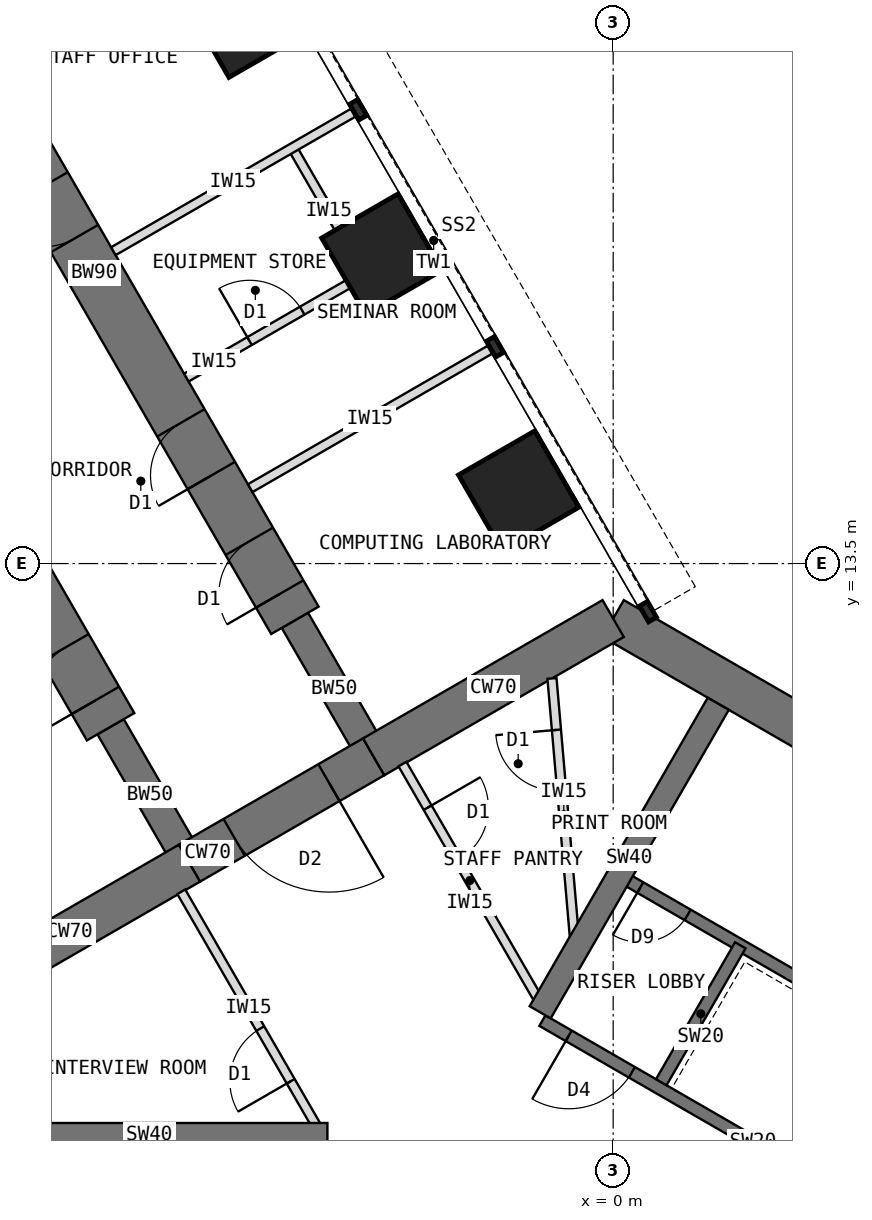
"""IFC4 building model, lengths in metres.
Left out: names, types, materials, properties, quantities, classifications, styles, units other than length and angle.
Written with IfcOpenShell. Run it as: python <this file> out.ifc"""

import sys

from ifc_helpers import new_model, si_unit, direction, frame, frame_2d, origin, origin_2d, place, context, subcontext, project, spatial, rectangle, extrude, element, fill, save


model = new_model("IFC4")
c1 = context("Model", 3, precision=1e-05, world=origin(), true_north=direction((0.0, 1.0)))
c2 = subcontext(c1, "Body", "Model", "MODEL_VIEW")
j1 = project(units=[si_unit("LENGTHUNIT", "METRE"), si_unit("PLANEANGLEUNIT", "RADIAN")], contexts=[c1])
p1 = place(None, origin())
s1 = spatial("IfcSite", under=j1, at=p1, CompositionType="ELEMENT")
p2 = place(p1, origin())
s2 = spatial("IfcBuilding", under=s1, at=p2, CompositionType="ELEMENT")
p3 = place(p2, frame((0.0, 0.0, 64.5)))
s3 = spatial("IfcBuildingStorey", under=s2, at=p3, CompositionType="ELEMENT", Elevation=64.5)
p4 = place(p3, frame((10.908, 6.298, 0.0), z_axis=(0.0, 0.0, 1.0), x_axis=(-0.866021940709, 0.500005998175, 0.0)))
e1 = element("IfcWall", 1, at=p4, inside=s3, PredefinedType="SHEAR", context=c2, shape_type="SweptSolid", body=[
    extrude(rectangle(XDim=12.596, YDim=0.7, at=frame_2d((6.298, 0.0))), origin(), (0.0, 0.0, 1.0), 4.0),
])
p5 = place(p3, frame((0.0, 12.596, 0.0), z_axis=(0.0, 0.0, 1.0), x_axis=(-0.866011268655, -0.500024481964, 0.0)))
e2 = element("IfcWall", 2, at=p5, inside=s3, PredefinedType="SHEAR", context=c2, shape_type="SweptSolid", body=[
    extrude(rectangle(XDim=4.548, YDim=0.7, at=frame_2d((2.274, 0.0))), origin(), (0.0, 0.0, 1.0), 4.0),
])
p6 = place(p3, frame((-3.939, 10.322, 0.0), z_axis=(0.0, 0.0, 1.0), x_axis=(-0.866019471182, -0.500010275428, 0.0)))
e3 = element("IfcWall", 3, at=p6, inside=s3, PredefinedType="SHEAR", context=c2, shape_type="SweptSolid", body=[
    extrude(rectangle(XDim=3.5, YDim=0.7, at=frame_2d((1.75, 0.0))), origin(), (0.0, 0.0, 1.0), 4.0),
])
p7 = place(p6, frame((0.85, 0.0, 0.0)))
e4 = element("IfcOpeningElement", 4, at=p7, cuts=e3, PredefinedType="OPENING", context=c2, shape_type="SweptSolid", body=[
    extrude(rectangle(XDim=1.8, YDim=2.1, at=frame_2d((0.9, 1.05))), frame((0.0, 0.36, 0.0), z_axis=(0.0, -1.0, 0.0), x_axis=(1.0, 0.0, 0.0)), (0.0, 0.0, 1.0), 0.72),
])
p8 = place(p3, frame((-6.97, 8.572, 0.0), z_axis=(0.0, 0.0, 1.0), x_axis=(-0.866034513004, -0.499984222037, 0.0)))
e5 = element("IfcWall", 5, at=p8, inside=s3, PredefinedType="SHEAR", context=c2, shape_type="SweptSolid", body=[
    extrude(rectangle(XDim=4.548, YDim=0.7, at=frame_2d((2.274, 0.0))), origin(), (0.0, 0.0, 1.0), 4.0),
])
p9 = place(p3, frame((-6.97, 8.572, 0.0), z_axis=(0.0, 0.0, 1.0), x_axis=(-0.499988811324, 0.866031863473, 0.0)))
e6 = element("IfcWall", 6, at=p9, inside=s3, PredefinedType="SHEAR", context=c2, shape_type="SweptSolid", body=[
    extrude(rectangle(XDim=2.592, YDim=0.5, at=frame_2d((1.296, 0.0))), origin(), (0.0, 0.0, 1.0), 4.0),
])
p10 = place(p3, frame((-8.266, 10.816, 0.0), z_axis=(0.0, 0.0, 1.0), x_axis=(-0.499996231654, 0.866027579429, 0.0)))
e7 = element("IfcWall", 7, at=p10, inside=s3, PredefinedType="SHEAR", context=c2, shape_type="SweptSolid", body=[
    extrude(rectangle(XDim=13.2, YDim=0.9, at=frame_2d((6.6, 0.0))), origin(), (0.0, 0.0, 1.0), 4.0),
])
p11 = place(p10, frame((0.5, 0.0, 0.0)))
e8 = element("IfcOpeningElement", 8, at=p11, cuts=e7, PredefinedType="OPENING", context=c2, shape_type="SweptSolid", body=[
    extrude(rectangle(XDim=1.0, YDim=2.1, at=frame_2d((0.5, 1.05))), frame((0.0, 0.46, 0.0), z_axis=(0.0, -1.0, 0.0), x_axis=(1.0, 0.0, 0.0)), (0.0, 0.0, 1.0), 0.92),
])
p12 = place(p10, frame((2.75, 0.0, 0.0)))
e9 = element("IfcOpeningElement", 9, at=p12, cuts=e7, PredefinedType="OPENING", context=c2, shape_type="SweptSolid", body=[
    extrude(rectangle(XDim=1.0, YDim=2.1, at=frame_2d((0.5, 1.05))), frame((0.0, 0.46, 0.0), z_axis=(0.0, -1.0, 0.0), x_axis=(1.0, 0.0, 0.0)), (0.0, 0.0, 1.0), 0.92),
])
p13 = place(p10, frame((7.25, 0.0, 0.0)))
e10 = element("IfcOpeningElement", 10, at=p13, cuts=e7, PredefinedType="OPENING", context=c2, shape_type="SweptSolid", body=[
    extrude(rectangle(XDim=1.0, YDim=2.1, at=frame_2d((0.5, 1.05))), frame((0.0, 0.46, 0.0), z_axis=(0.0, -1.0, 0.0), x_axis=(1.0, 0.0, 0.0)), (0.0, 0.0, 1.0), 0.92),
])
p14 = place(p3, frame((-3.939, 10.322, 0.0), z_axis=(0.0, 0.0, 1.0), x_axis=(-0.499918158782, 0.866072649678, 0.0)))
e11 = element("IfcWall", 11, at=p14, inside=s3, PredefinedType="SHEAR", context=c2, shape_type="SweptSolid", body=[
    extrude(rectangle(XDim=2.592, YDim=0.5, at=frame_2d((1.296, 0.0))), origin(), (0.0, 0.0, 1.0), 4.0),
])
p15 = place(p3, frame((-5.234, 12.566, 0.0), z_axis=(0.0, 0.0, 1.0), x_axis=(-0.500010103361, 0.866019570528, 0.0)))
e12 = element("IfcWall", 12, at=p15, inside=s3, PredefinedType="SHEAR", context=c2, shape_type="SweptSolid", body=[
    extrude(rectangle(XDim=13.2, YDim=0.9, at=frame_2d((6.6, 0.0))), origin(), (0.0, 0.0, 1.0), 4.0),
])
p16 = place(p15, frame((0.5, 0.0, 0.0)))
e13 = element("IfcOpeningElement", 13, at=p16, cuts=e12, PredefinedType="OPENING", context=c2, shape_type="SweptSolid", body=[
    extrude(rectangle(XDim=1.0, YDim=2.1, at=frame_2d((0.5, 1.05))), frame((0.0, 0.46, 0.0), z_axis=(0.0, -1.0, 0.0), x_axis=(1.0, 0.0, 0.0)), (0.0, 0.0, 1.0), 0.92),
])
p17 = place(p15, frame((2.75, 0.0, 0.0)))
e14 = element("IfcOpeningElement", 14, at=p17, cuts=e12, PredefinedType="OPENING", context=c2, shape_type="SweptSolid", body=[
    extrude(rectangle(XDim=1.0, YDim=2.1, at=frame_2d((0.5, 1.05))), frame((0.0, 0.46, 0.0), z_axis=(0.0, -1.0, 0.0), x_axis=(1.0, 0.0, 0.0)), (0.0, 0.0, 1.0), 0.92),
])
p18 = place(p15, frame((7.25, 0.0, 0.0)))
e15 = element("IfcOpeningElement", 15, at=p18, cuts=e12, PredefinedType="OPENING", context=c2, shape_type="SweptSolid", body=[
    extrude(rectangle(XDim=1.0, YDim=2.1, at=frame_2d((0.5, 1.05))), frame((0.0, 0.46, 0.0), z_axis=(0.0, -1.0, 0.0), x_axis=(1.0, 0.0, 0.0)), (0.0, 0.0, 1.0), 0.92),
])
for number, where, z_axis, x_axis in (
    (16, (-1.554, 14.691, 0.0), (0.0, 0.0, 1.0), (0.866, 0.5, 0.0)),
    (17, (-3.804, 18.588, 0.0), (0.0, 0.0, 1.0), (0.866, 0.5, 0.0)),
    (18, (-6.054, 22.486, 0.0), (0.0, 0.0, 1.0), (0.866, 0.5, 0.0)),
):
    element("IfcColumn", number, at=place(p3, frame(where, z_axis=z_axis, x_axis=x_axis)), inside=s3, PredefinedType="COLUMN", context=c2, shape_type="SweptSolid", body=[
        extrude(rectangle(XDim=1.45, YDim=1.45, at=origin_2d()), origin(), (0.0, 0.0, 1.0), 4.0),
    ])
p19 = place(p3, frame((5.764, 1.984, 0.0), z_axis=(0.0, 0.0, 1.0), x_axis=(-0.866026010844, 0.49999894854, 0.0)))
e19 = element("IfcWall", 19, at=p19, inside=s3, PredefinedType="SHEAR", context=c2, shape_type="SweptSolid", body=[
    extrude(rectangle(XDim=8.0, YDim=0.2, at=frame_2d((4.0, 0.0))), origin(), (0.0, 0.0, 1.0), 4.0),
])
p20 = place(p19, frame((6.3, 0.0, 0.0)))
e20 = element("IfcOpeningElement", 20, at=p20, cuts=e19, PredefinedType="OPENING", context=c2, shape_type="SweptSolid", body=[
    extrude(rectangle(XDim=1.2, YDim=2.1, at=frame_2d((0.6, 1.05))), frame((0.0, 0.11, 0.0), z_axis=(0.0, -1.0, 0.0), x_axis=(1.0, 0.0, 0.0)), (0.0, 0.0, 1.0), 0.22),
])
p21 = place(p3, frame((0.791, 4.97, 0.0), z_axis=(0.0, 0.0, 1.0), x_axis=(0.499936506574, 0.866062058628, 0.0)))
e21 = element("IfcWall", 21, at=p21, inside=s3, PredefinedType="SHEAR", context=c2, shape_type="SweptSolid", body=[
    extrude(rectangle(XDim=2.6, YDim=0.2, at=frame_2d((1.3, 0.0))), origin(), (0.0, 0.0, 1.0), 4.0),
])
p22 = place(p3, frame((7.114, 4.322, 0.0), z_axis=(0.0, 0.0, 1.0), x_axis=(-0.866026010844, 0.49999894854, 0.0)))
e22 = element("IfcWall", 22, at=p22, inside=s3, PredefinedType="SHEAR", context=c2, shape_type="SweptSolid", body=[
    extrude(rectangle(XDim=8.0, YDim=0.2, at=frame_2d((4.0, 0.0))), origin(), (0.0, 0.0, 1.0), 4.0),
])
p23 = place(p22, frame((6.8, 0.0, 0.0)))
e23 = element("IfcOpeningElement", 23, at=p23, cuts=e22, PredefinedType="OPENING", context=c2, shape_type="SweptSolid", body=[
    extrude(rectangle(XDim=0.9, YDim=2.1, at=frame_2d((0.45, 1.05))), frame((0.0, 0.11, 0.0), z_axis=(0.0, -1.0, 0.0), x_axis=(1.0, 0.0, 0.0)), (0.0, 0.0, 1.0), 0.22),
])
for number, where, z_axis, x_axis in (
    (24, (-1.201, 6.12, 0.0), (0.0, 0.0, 1.0), (0.5, 0.866, 0.0)),
    (25, (-4.7, 4.1, 0.0), (0.0, 0.0, 1.0), (-1.0, 0.0, 0.0)),
):
    element("IfcWall", number, at=place(p3, frame(where, z_axis=z_axis, x_axis=x_axis)), inside=s3, PredefinedType="SHEAR", context=c2, shape_type="SweptSolid", body=[
        extrude(rectangle(XDim=5.858, YDim=0.4, at=frame_2d((2.929, 0.0))), origin(), (0.0, 0.0, 1.0), 4.0),
    ])
for number, where, z_axis, x_axis in (
    (26, (-5.97, 14.74, 0.0), (0.0, 0.0, 1.0), (0.866, 0.5, 0.0)),
    (27, (-8.22, 18.637, 0.0), (0.0, 0.0, 1.0), (0.866, 0.5, 0.0)),
):
    element("IfcWall", number, at=place(p3, frame(where, z_axis=z_axis, x_axis=x_axis)), inside=s3, PredefinedType="PARTITIONING", context=c2, shape_type="SweptSolid", body=[
        extrude(rectangle(XDim=4.55, YDim=0.15, at=frame_2d((2.275, 0.0))), origin(), (0.0, 0.0, 1.0), 3.8),
    ])
p24 = place(p3, frame((-4.075, 18.259, 0.0), z_axis=(0.0, 0.0, 1.0), x_axis=(-0.500001309137, 0.866024647952, 0.0)))
e28 = element("IfcWall", 28, at=p24, inside=s3, PredefinedType="PARTITIONING", context=c2, shape_type="SweptSolid", body=[
    extrude(rectangle(XDim=2.4, YDim=0.15, at=frame_2d((1.2, 0.0))), origin(), (0.0, 0.0, 1.0), 3.8),
])
p25 = place(p3, frame((-7.02, 16.559, 0.0), z_axis=(0.0, 0.0, 1.0), x_axis=(0.866038511948, 0.499977295307, 0.0)))
e29 = element("IfcWall", 29, at=p25, inside=s3, PredefinedType="PARTITIONING", context=c2, shape_type="SweptSolid", body=[
    extrude(rectangle(XDim=3.4, YDim=0.15, at=frame_2d((1.7, 0.0))), origin(), (0.0, 0.0, 1.0), 3.8),
])
p26 = place(p25, frame((1.2, 0.0, 0.0)))
e30 = element("IfcOpeningElement", 30, at=p26, cuts=e29, PredefinedType="OPENING", context=c2, shape_type="SweptSolid", body=[
    extrude(rectangle(XDim=1.0, YDim=2.1, at=frame_2d((0.5, 1.05))), frame((0.0, 0.085, 0.0), z_axis=(0.0, -1.0, 0.0), x_axis=(1.0, 0.0, 0.0)), (0.0, 0.0, 1.0), 0.17),
])
p27 = place(p3, frame((-4.89, 4.27, 0.0), z_axis=(0.0, 0.0, 1.0), x_axis=(-0.500007369519, 0.866021148949, 0.0)))
e31 = element("IfcWall", 31, at=p27, inside=s3, PredefinedType="PARTITIONING", context=c2, shape_type="SweptSolid", body=[
    extrude(rectangle(XDim=4.426, YDim=0.15, at=frame_2d((2.213, 0.0))), origin(), (0.0, 0.0, 1.0), 3.8),
])
p28 = place(p27, frame((0.828, 0.0, 0.0)))
e32 = element("IfcOpeningElement", 32, at=p28, cuts=e31, PredefinedType="OPENING", context=c2, shape_type="SweptSolid", body=[
    extrude(rectangle(XDim=1.0, YDim=2.1, at=frame_2d((0.5, 1.05))), frame((0.0, 0.085, 0.0), z_axis=(0.0, -1.0, 0.0), x_axis=(1.0, 0.0, 0.0)), (0.0, 0.0, 1.0), 0.17),
])
p29 = place(p3, frame((-3.466, 10.202, 0.0), z_axis=(0.0, 0.0, 1.0), x_axis=(0.500007369519, -0.866021148949, 0.0)))
e33 = element("IfcWall", 33, at=p29, inside=s3, PredefinedType="PARTITIONING", context=c2, shape_type="SweptSolid", body=[
    extrude(rectangle(XDim=4.426, YDim=0.15, at=frame_2d((2.213, 0.0))), origin(), (0.0, 0.0, 1.0), 3.8),
])
p30 = place(p29, frame((0.828, 0.0, 0.0)))
e34 = element("IfcOpeningElement", 34, at=p30, cuts=e33, PredefinedType="OPENING", context=c2, shape_type="SweptSolid", body=[
    extrude(rectangle(XDim=1.0, YDim=2.1, at=frame_2d((0.5, 1.05))), frame((0.0, 0.085, 0.0), z_axis=(0.0, -1.0, 0.0), x_axis=(1.0, 0.0, 0.0)), (0.0, 0.0, 1.0), 0.17),
])
p31 = place(p3, frame((-0.618, 7.129, 0.0), z_axis=(0.0, 0.0, 1.0), x_axis=(-0.086409450071, 0.996259708579, 0.0)))
e35 = element("IfcWall", 35, at=p31, inside=s3, PredefinedType="PARTITIONING", context=c2, shape_type="SweptSolid", body=[
    extrude(rectangle(XDim=4.498, YDim=0.15, at=frame_2d((2.249, 0.0))), origin(), (0.0, 0.0, 1.0), 3.8),
])
p32 = place(p31, frame((2.648, 0.0, 0.0)))
e36 = element("IfcOpeningElement", 36, at=p32, cuts=e35, PredefinedType="OPENING", context=c2, shape_type="SweptSolid", body=[
    extrude(rectangle(XDim=1.0, YDim=2.1, at=frame_2d((0.5, 1.05))), frame((0.0, 0.085, 0.0), z_axis=(0.0, -1.0, 0.0), x_axis=(1.0, 0.0, 0.0)), (0.0, 0.0, 1.0), 0.17),
])
p33 = place(p20, origin())
e37 = element("IfcDoor", 37, at=p33, inside=s3, OperationType="SINGLE_SWING_RIGHT", PredefinedType="DOOR", context=c2, shape_type="SweptSolid", body=[
    extrude(rectangle(XDim=1.2, YDim=2.1, at=frame_2d((0.6, 1.05))), frame((0.0, 0.025, 0.0), z_axis=(0.0, -1.0, 0.0), x_axis=(1.0, 0.0, 0.0)), (0.0, 0.0, 1.0), 0.05),
])
fill(e20, e37)
p34 = place(p23, origin())
e38 = element("IfcDoor", 38, at=p34, inside=s3, OperationType="SINGLE_SWING_RIGHT", PredefinedType="DOOR", context=c2, shape_type="SweptSolid", body=[
    extrude(rectangle(XDim=0.9, YDim=2.1, at=frame_2d((0.45, 1.05))), frame((0.0, 0.025, 0.0), z_axis=(0.0, -1.0, 0.0), x_axis=(1.0, 0.0, 0.0)), (0.0, 0.0, 1.0), 0.05),
])
fill(e23, e38)
p35 = place(p7, origin())
e39 = element("IfcDoor", 39, at=p35, inside=s3, OperationType="DOUBLE_DOOR_DOUBLE_SWING", PredefinedType="DOOR", context=c2, shape_type="SweptSolid", body=[
    extrude(rectangle(XDim=1.72, YDim=2.06, at=frame_2d((0.9, 1.03))), frame((0.0, 0.025, 0.0), z_axis=(0.0, -1.0, 0.0), x_axis=(1.0, 0.0, 0.0)), (0.0, 0.0, 1.0), 0.05),
    extrude(rectangle(XDim=0.04, YDim=2.1, at=frame_2d((0.02, 1.05))), frame((0.0, 0.35, 0.0), z_axis=(0.0, -1.0, 0.0), x_axis=(1.0, 0.0, 0.0)), (0.0, 0.0, 1.0), 0.699),
    extrude(rectangle(XDim=0.04, YDim=2.1, at=frame_2d((1.78, 1.05))), frame((0.0, 0.35, 0.0), z_axis=(0.0, -1.0, 0.0), x_axis=(1.0, 0.0, 0.0)), (0.0, 0.0, 1.0), 0.699),
    extrude(rectangle(XDim=1.72, YDim=0.04, at=frame_2d((0.9, 2.08))), frame((0.0, 0.35, 0.0), z_axis=(0.0, -1.0, 0.0), x_axis=(1.0, 0.0, 0.0)), (0.0, 0.0, 1.0), 0.699),
])
fill(e4, e39)
p36 = place(p26, origin())
e40 = element("IfcDoor", 40, at=p36, inside=s3, OperationType="SINGLE_SWING_LEFT", PredefinedType="DOOR", context=c2, shape_type="SweptSolid", body=[
    extrude(rectangle(XDim=1.0, YDim=2.1, at=frame_2d((0.5, 1.05))), frame((0.0, 0.025, 0.0), z_axis=(0.0, -1.0, 0.0), x_axis=(1.0, 0.0, 0.0)), (0.0, 0.0, 1.0), 0.05),
])
fill(e30, e40)
p37 = place(p30, origin())
e41 = element("IfcDoor", 41, at=p37, inside=s3, OperationType="SINGLE_SWING_LEFT", PredefinedType="DOOR", context=c2, shape_type="SweptSolid", body=[
    extrude(rectangle(XDim=1.0, YDim=2.1, at=frame_2d((0.5, 1.05))), frame((0.0, 0.025, 0.0), z_axis=(0.0, -1.0, 0.0), x_axis=(1.0, 0.0, 0.0)), (0.0, 0.0, 1.0), 0.05),
])
fill(e34, e41)
p38 = place(p32, origin())
e42 = element("IfcDoor", 42, at=p38, inside=s3, OperationType="SINGLE_SWING_RIGHT", PredefinedType="DOOR", context=c2, shape_type="SweptSolid", body=[
    extrude(rectangle(XDim=1.0, YDim=2.1, at=frame_2d((0.5, 1.05))), frame((0.0, 0.025, 0.0), z_axis=(0.0, -1.0, 0.0), x_axis=(1.0, 0.0, 0.0)), (0.0, 0.0, 1.0), 0.05),
])
fill(e36, e42)
p39 = place(p28, origin())
e43 = element("IfcDoor", 43, at=p39, inside=s3, OperationType="SINGLE_SWING_LEFT", PredefinedType="DOOR", context=c2, shape_type="SweptSolid", body=[
    extrude(rectangle(XDim=1.0, YDim=2.1, at=frame_2d((0.5, 1.05))), frame((0.0, 0.025, 0.0), z_axis=(0.0, -1.0, 0.0), x_axis=(1.0, 0.0, 0.0)), (0.0, 0.0, 1.0), 0.05),
])
fill(e32, e43)
p40 = place(p11, origin())
e44 = element("IfcDoor", 44, at=p40, inside=s3, OperationType="SINGLE_SWING_LEFT", PredefinedType="DOOR", context=c2, shape_type="SweptSolid", body=[
    extrude(rectangle(XDim=0.92, YDim=2.06, at=frame_2d((0.5, 1.03))), frame((0.0, 0.025, 0.0), z_axis=(0.0, -1.0, 0.0), x_axis=(1.0, 0.0, 0.0)), (0.0, 0.0, 1.0), 0.05),
    extrude(rectangle(XDim=0.04, YDim=2.1, at=frame_2d((0.02, 1.05))), frame((0.0, 0.45, 0.0), z_axis=(0.0, -1.0, 0.0), x_axis=(1.0, 0.0, 0.0)), (0.0, 0.0, 1.0), 0.899),
    extrude(rectangle(XDim=0.04, YDim=2.1, at=frame_2d((0.98, 1.05))), frame((0.0, 0.45, 0.0), z_axis=(0.0, -1.0, 0.0), x_axis=(1.0, 0.0, 0.0)), (0.0, 0.0, 1.0), 0.899),
    extrude(rectangle(XDim=0.92, YDim=0.04, at=frame_2d((0.5, 2.08))), frame((0.0, 0.45, 0.0), z_axis=(0.0, -1.0, 0.0), x_axis=(1.0, 0.0, 0.0)), (0.0, 0.0, 1.0), 0.899),
])
fill(e8, e44)
p41 = place(p16, origin())
e45 = element("IfcDoor", 45, at=p41, inside=s3, OperationType="SINGLE_SWING_LEFT", PredefinedType="DOOR", context=c2, shape_type="SweptSolid", body=[
    extrude(rectangle(XDim=0.92, YDim=2.06, at=frame_2d((0.5, 1.03))), frame((0.0, 0.025, 0.0), z_axis=(0.0, -1.0, 0.0), x_axis=(1.0, 0.0, 0.0)), (0.0, 0.0, 1.0), 0.05),
    extrude(rectangle(XDim=0.04, YDim=2.1, at=frame_2d((0.02, 1.05))), frame((0.0, 0.45, 0.0), z_axis=(0.0, -1.0, 0.0), x_axis=(1.0, 0.0, 0.0)), (0.0, 0.0, 1.0), 0.899),
    extrude(rectangle(XDim=0.04, YDim=2.1, at=frame_2d((0.98, 1.05))), frame((0.0, 0.45, 0.0), z_axis=(0.0, -1.0, 0.0), x_axis=(1.0, 0.0, 0.0)), (0.0, 0.0, 1.0), 0.899),
    extrude(rectangle(XDim=0.92, YDim=0.04, at=frame_2d((0.5, 2.08))), frame((0.0, 0.45, 0.0), z_axis=(0.0, -1.0, 0.0), x_axis=(1.0, 0.0, 0.0)), (0.0, 0.0, 1.0), 0.899),
])
fill(e13, e45)
p42 = place(p17, origin())
e46 = element("IfcDoor", 46, at=p42, inside=s3, OperationType="SINGLE_SWING_LEFT", PredefinedType="DOOR", context=c2, shape_type="SweptSolid", body=[
    extrude(rectangle(XDim=0.92, YDim=2.06, at=frame_2d((0.5, 1.03))), frame((0.0, 0.025, 0.0), z_axis=(0.0, -1.0, 0.0), x_axis=(1.0, 0.0, 0.0)), (0.0, 0.0, 1.0), 0.05),
    extrude(rectangle(XDim=0.04, YDim=2.1, at=frame_2d((0.02, 1.05))), frame((0.0, 0.45, 0.0), z_axis=(0.0, -1.0, 0.0), x_axis=(1.0, 0.0, 0.0)), (0.0, 0.0, 1.0), 0.899),
    extrude(rectangle(XDim=0.04, YDim=2.1, at=frame_2d((0.98, 1.05))), frame((0.0, 0.45, 0.0), z_axis=(0.0, -1.0, 0.0), x_axis=(1.0, 0.0, 0.0)), (0.0, 0.0, 1.0), 0.899),
    extrude(rectangle(XDim=0.92, YDim=0.04, at=frame_2d((0.5, 2.08))), frame((0.0, 0.45, 0.0), z_axis=(0.0, -1.0, 0.0), x_axis=(1.0, 0.0, 0.0)), (0.0, 0.0, 1.0), 0.899),
])
fill(e14, e46)
p43 = place(p18, origin())
e47 = element("IfcDoor", 47, at=p43, inside=s3, OperationType="SINGLE_SWING_RIGHT", PredefinedType="DOOR", context=c2, shape_type="SweptSolid", body=[
    extrude(rectangle(XDim=0.92, YDim=2.06, at=frame_2d((0.5, 1.03))), frame((0.0, 0.025, 0.0), z_axis=(0.0, -1.0, 0.0), x_axis=(1.0, 0.0, 0.0)), (0.0, 0.0, 1.0), 0.05),
    extrude(rectangle(XDim=0.04, YDim=2.1, at=frame_2d((0.02, 1.05))), frame((0.0, 0.45, 0.0), z_axis=(0.0, -1.0, 0.0), x_axis=(1.0, 0.0, 0.0)), (0.0, 0.0, 1.0), 0.899),
    extrude(rectangle(XDim=0.04, YDim=2.1, at=frame_2d((0.98, 1.05))), frame((0.0, 0.45, 0.0), z_axis=(0.0, -1.0, 0.0), x_axis=(1.0, 0.0, 0.0)), (0.0, 0.0, 1.0), 0.899),
    extrude(rectangle(XDim=0.92, YDim=0.04, at=frame_2d((0.5, 2.08))), frame((0.0, 0.45, 0.0), z_axis=(0.0, -1.0, 0.0), x_axis=(1.0, 0.0, 0.0)), (0.0, 0.0, 1.0), 0.899),
])
fill(e15, e47)
save(model, sys.argv[1])
